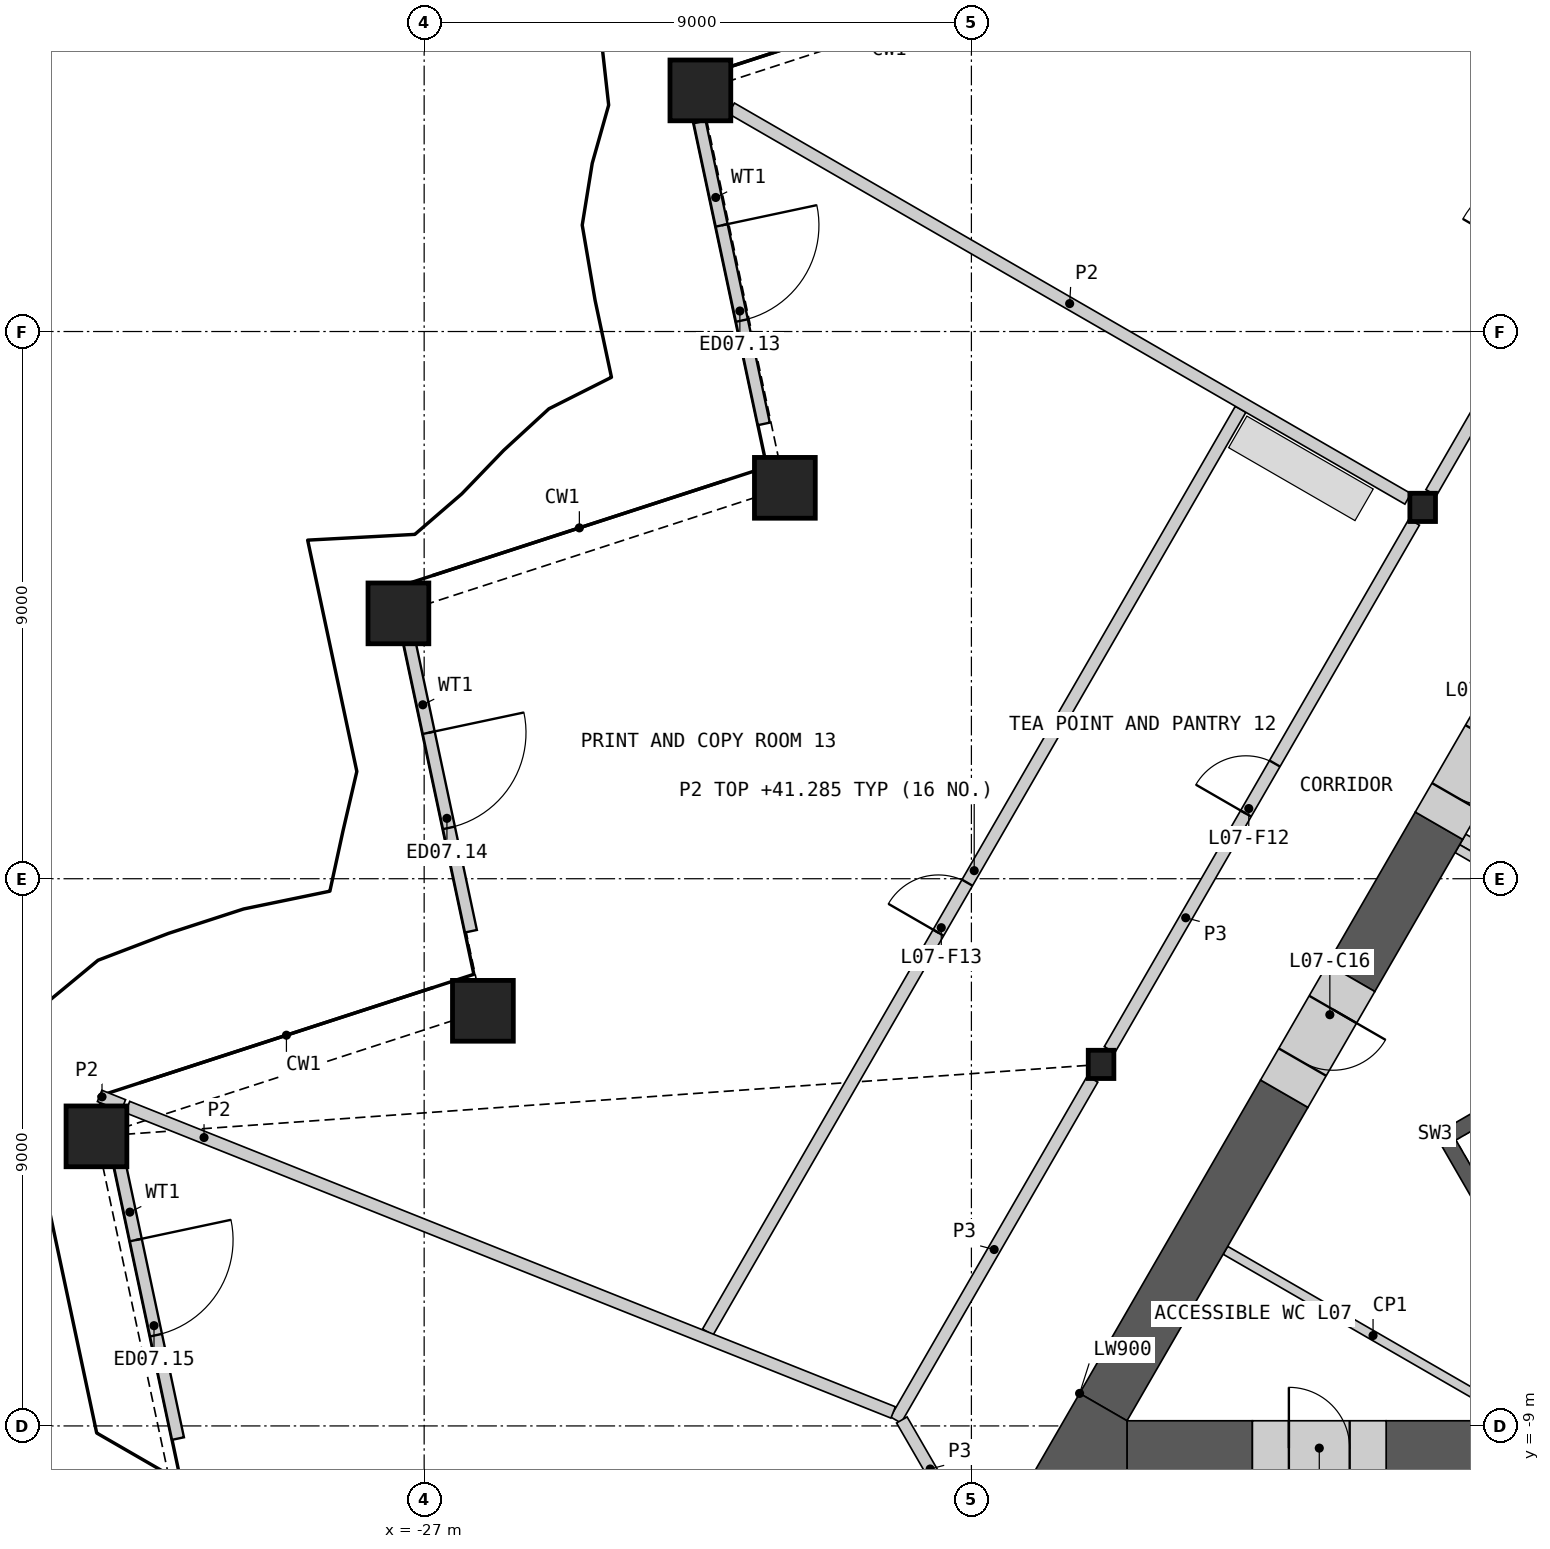
"""IFC4 building model, lengths in metres.
Left out: names, types, materials, properties, quantities, classifications, styles, units other than length and angle.
Written with IfcOpenShell. Run it as: python <this file> out.ifc"""

import sys

from ifc_helpers import new_model, si_unit, direction, frame, frame_2d, origin, origin_2d, place, context, subcontext, project, spatial, polyline, rectangle, hollow_rectangle, i_section, outline, extrude, element, fill, save


model = new_model("IFC4")
c1 = context("Model", 3, precision=1e-05, world=origin(), true_north=direction((0.0, 1.0)))
c2 = subcontext(c1, "Body", "Model", "MODEL_VIEW")
j1 = project(units=[si_unit("LENGTHUNIT", "METRE"), si_unit("PLANEANGLEUNIT", "RADIAN")], contexts=[c1])
p1 = place(None, origin())
s1 = spatial("IfcSite", under=j1, at=p1, CompositionType="ELEMENT")
p2 = place(p1, origin())
s2 = spatial("IfcBuilding", under=s1, at=p2, CompositionType="ELEMENT")
p3 = place(p2, frame((0.0, 0.0, 38.4)))
s3 = spatial("IfcBuildingStorey", under=s2, at=p3, CompositionType="ELEMENT", Elevation=38.4)
for number, where, z_axis, x_axis in (
    (1, (-22.457, 12.966, 0.0), (0.0, 0.0, 1.0), (1.0, 0.0, 0.0)),
    (2, (-21.068, 6.429, 0.0), (0.0, 0.0, 1.0), (1.0, 0.0, 0.0)),
    (3, (-27.423, 4.364, 0.0), (0.0, 0.0, 1.0), (1.0, 0.0, 0.0)),
    (4, (-26.034, -2.172, 0.0), (0.0, 0.0, 1.0), (1.0, 0.0, 0.0)),
    (5, (-32.389, -4.237, 0.0), (0.0, 0.0, 1.0), (1.0, 0.0, 0.0)),
):
    element("IfcColumn", number, at=place(p3, frame(where, z_axis=z_axis, x_axis=x_axis)), inside=s3, PredefinedType="COLUMN", context=c2, shape_type="SweptSolid", body=[
        extrude(hollow_rectangle(XDim=1.0, YDim=1.0, WallThickness=0.07, at=origin_2d()), origin(), (0.0, 0.0, 1.0), 4.2),
    ])
for number, where, z_axis, x_axis in (
    (6, (-10.578, 6.107, 0.0), (0.0, 0.0, 1.0), (1.0, 0.0, 0.0)),
    (7, (-15.868, -3.054, 0.0), (0.0, 0.0, 1.0), (1.0, 0.0, 0.0)),
):
    element("IfcColumn", number, at=place(p3, frame(where, z_axis=z_axis, x_axis=x_axis)), inside=s3, PredefinedType="COLUMN", context=c2, shape_type="SweptSolid", body=[
        extrude(i_section(OverallWidth=0.421, OverallDepth=0.465, WebThickness=0.045, FlangeThickness=0.072, at=origin_2d()), origin(), (0.0, 0.0, 1.0), 4.2),
    ])
p4 = place(p3, frame((-22.469, 12.446, 0.0), z_axis=(0.0, 0.0, 1.0), x_axis=(0.207903044531, -0.978149438519, 0.0)))
e8 = element("IfcWall", 8, at=p4, inside=s3, PredefinedType="SOLIDWALL", context=c2, shape_type="SweptSolid", body=[
    extrude(rectangle(XDim=5.076, YDim=0.2, at=frame_2d((2.538, 0.0))), origin(), (0.0, 0.0, 1.0), 3.189),
])
p5 = place(p4, frame((1.738, 0.0, 0.0)))
e9 = element("IfcOpeningElement", 9, at=p5, cuts=e8, PredefinedType="OPENING", context=c2, shape_type="SweptSolid", body=[
    extrude(rectangle(XDim=1.6, YDim=2.4, at=frame_2d((0.8, 1.2))), frame((0.0, 0.11, 0.0), z_axis=(0.0, -1.0, 0.0), x_axis=(1.0, 0.0, 0.0)), (0.0, 0.0, 1.0), 0.22),
])
p6 = place(p3, frame((-27.286, 4.102, 0.0), z_axis=(0.0, 0.0, 1.0), x_axis=(0.207949057422, -0.978139657471, 0.0)))
e10 = element("IfcWall", 10, at=p6, inside=s3, PredefinedType="SOLIDWALL", context=c2, shape_type="SweptSolid", body=[
    extrude(rectangle(XDim=5.077, YDim=0.2, at=frame_2d((2.538, 0.0))), origin(), (0.0, 0.0, 1.0), 3.189),
])
p7 = place(p6, frame((1.738, 0.0, 0.0)))
e11 = element("IfcOpeningElement", 11, at=p7, cuts=e10, PredefinedType="OPENING", context=c2, shape_type="SweptSolid", body=[
    extrude(rectangle(XDim=1.6, YDim=2.4, at=frame_2d((0.8, 1.2))), frame((0.0, 0.11, 0.0), z_axis=(0.0, -1.0, 0.0), x_axis=(1.0, 0.0, 0.0)), (0.0, 0.0, 1.0), 0.22),
])
p8 = place(p3, frame((-32.104, -4.242, 0.0), z_axis=(0.0, 0.0, 1.0), x_axis=(0.207903044531, -0.978149438519, 0.0)))
e12 = element("IfcWall", 12, at=p8, inside=s3, PredefinedType="SOLIDWALL", context=c2, shape_type="SweptSolid", body=[
    extrude(rectangle(XDim=5.076, YDim=0.2, at=frame_2d((2.538, 0.0))), origin(), (0.0, 0.0, 1.0), 3.189),
])
p9 = place(p8, frame((1.738, 0.0, 0.0)))
e13 = element("IfcOpeningElement", 13, at=p9, cuts=e12, PredefinedType="OPENING", context=c2, shape_type="SweptSolid", body=[
    extrude(rectangle(XDim=1.6, YDim=2.4, at=frame_2d((0.8, 1.2))), frame((0.0, 0.11, 0.0), z_axis=(0.0, -1.0, 0.0), x_axis=(1.0, 0.0, 0.0)), (0.0, 0.0, 1.0), 0.22),
])
p10 = place(p3, frame((-8.181, -0.357, 0.0), z_axis=(0.0, 0.0, 1.0), x_axis=(-0.866035824272, 0.499981950752, 0.0)))
e14 = element("IfcWall", 14, at=p10, inside=s3, PredefinedType="SHEAR", context=c2, shape_type="SweptSolid", body=[
    extrude(rectangle(XDim=2.009, YDim=0.2, at=frame_2d((1.004, 0.0))), origin(), (0.0, 0.0, 1.0), 3.8),
])
p11 = place(p3, origin())
e15 = element("IfcWall", 15, at=p11, inside=s3, PredefinedType="SHEAR", context=c2, shape_type="SweptSolid", body=[
    extrude(outline(polyline([(-5.307, -1.281), (-10.374, -4.206), (-10.032, -4.298), (-5.182, -1.498), (-5.307, -1.281)])), origin(), (0.0, 0.0, 1.0), 3.8),
])
p12 = place(p3, origin())
e16 = element("IfcWall", 16, at=p12, inside=s3, PredefinedType="SHEAR", context=c2, shape_type="SweptSolid", body=[
    extrude(outline(polyline([(-10.374, -4.206), (-8.83, -6.881), (-8.738, -6.539), (-10.032, -4.298), (-10.374, -4.206)])), origin(), (0.0, 0.0, 1.0), 3.8),
])
p13 = place(p3, frame((-8.268, -0.509, 0.0), z_axis=(0.0, 0.0, 1.0), x_axis=(-0.866035824272, 0.499981950752, 0.0)))
e17 = element("IfcWall", 17, at=p13, inside=s3, PredefinedType="PARTITIONING", context=c2, shape_type="SweptSolid", body=[
    extrude(rectangle(XDim=2.009, YDim=0.15, at=frame_2d((1.004, 0.0))), origin(), (0.0, 0.0, 1.0), 3.8),
])
p14 = place(p3, frame((-13.823, -6.111, 0.0), z_axis=(0.0, 0.0, 1.0), x_axis=(0.866026802741, -0.499997576928, 0.0)))
e18 = element("IfcWall", 18, at=p14, inside=s3, PredefinedType="PARTITIONING", context=c2, shape_type="SweptSolid", body=[
    extrude(rectangle(XDim=5.607, YDim=0.15, at=frame_2d((2.804, 0.0))), origin(), (0.0, 0.0, 1.0), 3.8),
])
p15 = place(p3, frame((-11.179, -9.365, 0.0), z_axis=(0.0, 0.0, 1.0), x_axis=(1.0, 0.0, 0.0)))
e19 = element("IfcWall", 19, at=p15, inside=s3, PredefinedType="SHEAR", context=c2, shape_type="SweptSolid", body=[
    extrude(rectangle(XDim=15.55, YDim=0.9, at=frame_2d((7.775, 0.0))), origin(), (0.0, 0.0, 1.0), 3.8),
])
p16 = place(p3, frame((-15.441, -9.365, 0.0), z_axis=(0.0, 0.0, 1.0), x_axis=(1.0, 0.0, 0.0)))
e20 = element("IfcWall", 20, at=p16, inside=s3, PredefinedType="SHEAR", context=c2, shape_type="SweptSolid", body=[
    extrude(rectangle(XDim=2.062, YDim=0.9, at=frame_2d((1.031, 0.0))), origin(), (0.0, 0.0, 1.0), 3.8),
])
p17 = place(p3, frame((-12.855, -3.536, 0.0), z_axis=(0.0, 0.0, 1.0), x_axis=(-0.499999419053, -0.866025739194, 0.0)))
e21 = element("IfcWall", 21, at=p17, inside=s3, PredefinedType="SHEAR", context=c2, shape_type="SweptSolid", body=[
    extrude(rectangle(XDim=5.952, YDim=0.9, at=frame_2d((2.976, 0.0))), origin(), (0.0, 0.0, 1.0), 3.8),
])
p18 = place(p3, frame((-10.31, 0.872, 0.0), z_axis=(0.0, 0.0, 1.0), x_axis=(-0.499946751862, -0.866056144429, 0.0)))
e22 = element("IfcWall", 22, at=p18, inside=s3, PredefinedType="SHEAR", context=c2, shape_type="SweptSolid", body=[
    extrude(rectangle(XDim=2.889, YDim=0.9, at=frame_2d((1.445, 0.0))), origin(), (0.0, 0.0, 1.0), 3.8),
])
p19 = place(p3, origin())
e23 = element("IfcWall", 23, at=p19, inside=s3, PredefinedType="SHEAR", context=c2, shape_type="SweptSolid", body=[
    extrude(outline(polyline([(-16.221, -8.465), (-15.441, -8.915), (-15.441, -9.815), (-17.0, -9.815), (-16.221, -8.465)])), origin(), (0.0, 0.0, 1.0), 3.8),
])
p20 = place(p3, frame((-13.379, -9.365, 0.0), z_axis=(0.0, 0.0, 1.0), x_axis=(1.0, 0.0, 0.0)))
e24 = element("IfcWall", 24, at=p20, inside=s3, PredefinedType="SHEAR", context=c2, shape_type="SweptSolid", body=[
    extrude(rectangle(XDim=2.2, YDim=0.9, at=frame_2d((1.1, 0.0))), origin(), (0.0, 0.0, 1.0), 3.8),
])
p21 = place(p20, frame((0.6, 0.0, 0.0)))
e25 = element("IfcOpeningElement", 25, at=p21, cuts=e24, PredefinedType="OPENING", context=c2, shape_type="SweptSolid", body=[
    extrude(rectangle(XDim=1.0, YDim=2.1, at=frame_2d((0.5, 1.05))), frame((0.0, 0.46, 0.0), z_axis=(0.0, -1.0, 0.0), x_axis=(1.0, 0.0, 0.0)), (0.0, 0.0, 1.0), 0.92),
])
p22 = place(p3, frame((-11.755, -1.63, 0.0), z_axis=(0.0, 0.0, 1.0), x_axis=(-0.50002983664, -0.866008176907, 0.0)))
e26 = element("IfcWall", 26, at=p22, inside=s3, PredefinedType="SHEAR", context=c2, shape_type="SweptSolid", body=[
    extrude(rectangle(XDim=2.2, YDim=0.9, at=frame_2d((1.1, 0.0))), origin(), (0.0, 0.0, 1.0), 3.8),
])
p23 = place(p22, frame((0.6, 0.0, 0.0)))
e27 = element("IfcOpeningElement", 27, at=p23, cuts=e26, PredefinedType="OPENING", context=c2, shape_type="SweptSolid", body=[
    extrude(rectangle(XDim=1.0, YDim=2.1, at=frame_2d((0.5, 1.05))), frame((0.0, 0.46, 0.0), z_axis=(0.0, -1.0, 0.0), x_axis=(1.0, 0.0, 0.0)), (0.0, 0.0, 1.0), 0.92),
])
p24 = place(p3, frame((-9.21, 2.777, 0.0), z_axis=(0.0, 0.0, 1.0), x_axis=(-0.500077893725, -0.86598042715, 0.0)))
e28 = element("IfcWall", 28, at=p24, inside=s3, PredefinedType="SHEAR", context=c2, shape_type="SweptSolid", body=[
    extrude(rectangle(XDim=2.2, YDim=0.9, at=frame_2d((1.1, 0.0))), origin(), (0.0, 0.0, 1.0), 3.8),
])
p25 = place(p24, frame((0.55, 0.0, 0.0)))
e29 = element("IfcOpeningElement", 29, at=p25, cuts=e28, PredefinedType="OPENING", context=c2, shape_type="SweptSolid", body=[
    extrude(rectangle(XDim=1.1, YDim=2.1, at=frame_2d((0.55, 1.05))), frame((0.0, 0.46, 0.0), z_axis=(0.0, -1.0, 0.0), x_axis=(1.0, 0.0, 0.0)), (0.0, 0.0, 1.0), 0.92),
])
p26 = place(p3, frame((-10.439, 6.35, 0.0), z_axis=(0.0, 0.0, 1.0), x_axis=(0.50001002959, 0.86601961312, 0.0)))
e30 = element("IfcWall", 30, at=p26, inside=s3, PredefinedType="PARTITIONING", context=c2, shape_type="SweptSolid", body=[
    extrude(rectangle(XDim=10.019, YDim=0.2, at=frame_2d((5.009, 0.0))), origin(), (0.0, 0.0, 1.0), 3.8),
])
p27 = place(p26, frame((4.16, 0.0, 0.0)))
e31 = element("IfcOpeningElement", 31, at=p27, cuts=e30, PredefinedType="OPENING", context=c2, shape_type="SweptSolid", body=[
    extrude(rectangle(XDim=1.8, YDim=2.1, at=frame_2d((0.9, 1.05))), frame((0.0, 0.11, 0.0), z_axis=(0.0, -1.0, 0.0), x_axis=(1.0, 0.0, 0.0)), (0.0, 0.0, 1.0), 0.22),
])
p28 = place(p3, frame((-15.728, -2.811, 0.0), z_axis=(0.0, 0.0, 1.0), x_axis=(0.49999175339, 0.866030164915, 0.0)))
e32 = element("IfcWall", 32, at=p28, inside=s3, PredefinedType="PARTITIONING", context=c2, shape_type="SweptSolid", body=[
    extrude(rectangle(XDim=10.019, YDim=0.2, at=frame_2d((5.009, 0.0))), origin(), (0.0, 0.0, 1.0), 3.8),
])
p29 = place(p28, frame((4.484, 0.0, 0.0)))
e33 = element("IfcOpeningElement", 33, at=p29, cuts=e32, PredefinedType="OPENING", context=c2, shape_type="SweptSolid", body=[
    extrude(rectangle(XDim=0.95, YDim=2.1, at=frame_2d((0.475, 1.05))), frame((0.0, 0.11, 0.0), z_axis=(0.0, -1.0, 0.0), x_axis=(1.0, 0.0, 0.0)), (0.0, 0.0, 1.0), 0.22),
])
p30 = place(p3, frame((-19.244, -8.902, 0.0), z_axis=(0.0, 0.0, 1.0), x_axis=(0.499984737558, 0.86603421538, 0.0)))
e34 = element("IfcWall", 34, at=p30, inside=s3, PredefinedType="PARTITIONING", context=c2, shape_type="SweptSolid", body=[
    extrude(rectangle(XDim=6.473, YDim=0.2, at=frame_2d((3.236, 0.0))), origin(), (0.0, 0.0, 1.0), 3.8),
])
p31 = place(p3, frame((-19.144, -8.902, 0.0), z_axis=(0.0, 0.0, 1.0), x_axis=(0.499958791762, -0.866049194065, 0.0)))
e35 = element("IfcWall", 35, at=p31, inside=s3, PredefinedType="PARTITIONING", context=c2, shape_type="SweptSolid", body=[
    extrude(rectangle(XDim=3.726, YDim=0.2, at=frame_2d((1.863, 0.0))), origin(), (0.0, 0.0, 1.0), 3.8),
])
p32 = place(p31, frame((1.363, 0.0, 0.0)))
e36 = element("IfcOpeningElement", 36, at=p32, cuts=e35, PredefinedType="OPENING", context=c2, shape_type="SweptSolid", body=[
    extrude(rectangle(XDim=1.0, YDim=2.1, at=frame_2d((0.5, 1.05))), frame((0.0, 0.11, 0.0), z_axis=(0.0, -1.0, 0.0), x_axis=(1.0, 0.0, 0.0)), (0.0, 0.0, 1.0), 0.22),
])
p33 = place(p3, frame((-22.335, -7.455, 0.0), z_axis=(0.0, 0.0, 1.0), x_axis=(0.499997414609, 0.866026896456, 0.0)))
e37 = element("IfcWall", 37, at=p33, inside=s3, PredefinedType="PARTITIONING", context=c2, shape_type="SweptSolid", body=[
    extrude(rectangle(XDim=17.524, YDim=0.2, at=frame_2d((8.762, 0.0))), origin(), (0.0, 0.0, 1.0), 2.885),
])
p34 = place(p33, frame((7.584, 0.0, 0.0)))
e38 = element("IfcOpeningElement", 38, at=p34, cuts=e37, PredefinedType="OPENING", context=c2, shape_type="SweptSolid", body=[
    extrude(rectangle(XDim=0.95, YDim=2.1, at=frame_2d((0.475, 1.05))), frame((0.0, 0.11, 0.0), z_axis=(0.0, -1.0, 0.0), x_axis=(1.0, 0.0, 0.0)), (0.0, 0.0, 1.0), 0.22),
])
p35 = place(p3, frame((-31.879, -3.754, 0.0), z_axis=(0.0, 0.0, 1.0), x_axis=(0.928821541656, -0.370527385973, 0.0)))
e39 = element("IfcWall", 39, at=p35, inside=s3, PredefinedType="PARTITIONING", context=c2, shape_type="SweptSolid", body=[
    extrude(rectangle(XDim=13.558, YDim=0.2, at=frame_2d((6.779, 0.0))), origin(), (0.0, 0.0, 1.0), 2.885),
])
p36 = place(p3, frame((-21.947, 12.671, 0.0), z_axis=(0.0, 0.0, 1.0), x_axis=(0.866026729935, -0.499997703033, 0.0)))
e40 = element("IfcWall", 40, at=p36, inside=s3, PredefinedType="PARTITIONING", context=c2, shape_type="SweptSolid", body=[
    extrude(rectangle(XDim=12.848, YDim=0.2, at=frame_2d((6.424, 0.0))), origin(), (0.0, 0.0, 1.0), 2.885),
])
p37 = place(p3, frame((-32.337, -3.572, 0.0), z_axis=(0.0, 0.0, 1.0), x_axis=(0.928757356094, -0.370688243003, 0.0)))
e41 = element("IfcWall", 41, at=p37, inside=s3, PredefinedType="PARTITIONING", context=c2, shape_type="SweptSolid", body=[
    extrude(rectangle(XDim=0.419, YDim=0.2, at=frame_2d((0.21, 0.0))), origin(), (0.0, 0.0, 1.0), 2.885),
])
p38 = place(p5, origin())
e42 = element("IfcDoor", 42, at=p38, inside=s3, OperationType="DOUBLE_DOOR_SINGLE_SWING", PredefinedType="DOOR", context=c2, shape_type="SweptSolid", body=[
    extrude(rectangle(XDim=1.6, YDim=2.4, at=frame_2d((0.8, 1.2))), frame((0.0, 0.025, 0.0), z_axis=(0.0, -1.0, 0.0), x_axis=(1.0, 0.0, 0.0)), (0.0, 0.0, 1.0), 0.05),
])
fill(e9, e42)
p39 = place(p7, origin())
e43 = element("IfcDoor", 43, at=p39, inside=s3, OperationType="DOUBLE_DOOR_SINGLE_SWING", PredefinedType="DOOR", context=c2, shape_type="SweptSolid", body=[
    extrude(rectangle(XDim=1.6, YDim=2.4, at=frame_2d((0.8, 1.2))), frame((0.0, 0.025, 0.0), z_axis=(0.0, -1.0, 0.0), x_axis=(1.0, 0.0, 0.0)), (0.0, 0.0, 1.0), 0.05),
])
fill(e11, e43)
p40 = place(p9, origin())
e44 = element("IfcDoor", 44, at=p40, inside=s3, OperationType="DOUBLE_DOOR_SINGLE_SWING", PredefinedType="DOOR", context=c2, shape_type="SweptSolid", body=[
    extrude(rectangle(XDim=1.6, YDim=2.4, at=frame_2d((0.8, 1.2))), frame((0.0, 0.025, 0.0), z_axis=(0.0, -1.0, 0.0), x_axis=(1.0, 0.0, 0.0)), (0.0, 0.0, 1.0), 0.05),
])
fill(e13, e44)
p41 = place(p21, origin())
e45 = element("IfcDoor", 45, at=p41, inside=s3, OperationType="SINGLE_SWING_LEFT", PredefinedType="DOOR", context=c2, shape_type="SweptSolid", body=[
    extrude(rectangle(XDim=1.0, YDim=2.1, at=frame_2d((0.5, 1.05))), frame((0.0, 0.205, 0.0), z_axis=(0.0, -1.0, 0.0), x_axis=(1.0, 0.0, 0.0)), (0.0, 0.0, 1.0), 0.05),
])
fill(e25, e45)
p42 = place(p23, origin())
e46 = element("IfcDoor", 46, at=p42, inside=s3, OperationType="SINGLE_SWING_LEFT", PredefinedType="DOOR", context=c2, shape_type="SweptSolid", body=[
    extrude(rectangle(XDim=1.0, YDim=2.1, at=frame_2d((0.5, 1.05))), frame((0.0, 0.205, 0.0), z_axis=(0.0, -1.0, 0.0), x_axis=(1.0, 0.0, 0.0)), (0.0, 0.0, 1.0), 0.05),
])
fill(e27, e46)
p43 = place(p25, origin())
e47 = element("IfcDoor", 47, at=p43, inside=s3, OperationType="SINGLE_SWING_LEFT", PredefinedType="DOOR", context=c2, shape_type="SweptSolid", body=[
    extrude(rectangle(XDim=1.1, YDim=2.1, at=frame_2d((0.55, 1.05))), frame((0.0, 0.205, 0.0), z_axis=(0.0, -1.0, 0.0), x_axis=(1.0, 0.0, 0.0)), (0.0, 0.0, 1.0), 0.05),
])
fill(e29, e47)
p44 = place(p29, origin())
e48 = element("IfcDoor", 48, at=p44, inside=s3, OperationType="SINGLE_SWING_LEFT", PredefinedType="DOOR", context=c2, shape_type="SweptSolid", body=[
    extrude(rectangle(XDim=0.95, YDim=2.1, at=frame_2d((0.475, 1.05))), frame((0.0, 0.025, 0.0), z_axis=(0.0, -1.0, 0.0), x_axis=(1.0, 0.0, 0.0)), (0.0, 0.0, 1.0), 0.05),
])
fill(e33, e48)
p45 = place(p34, origin())
e49 = element("IfcDoor", 49, at=p45, inside=s3, OperationType="SINGLE_SWING_LEFT", PredefinedType="DOOR", context=c2, shape_type="SweptSolid", body=[
    extrude(rectangle(XDim=0.95, YDim=2.1, at=frame_2d((0.475, 1.05))), frame((0.0, 0.025, 0.0), z_axis=(0.0, -1.0, 0.0), x_axis=(1.0, 0.0, 0.0)), (0.0, 0.0, 1.0), 0.05),
])
fill(e38, e49)
save(model, sys.argv[1])
